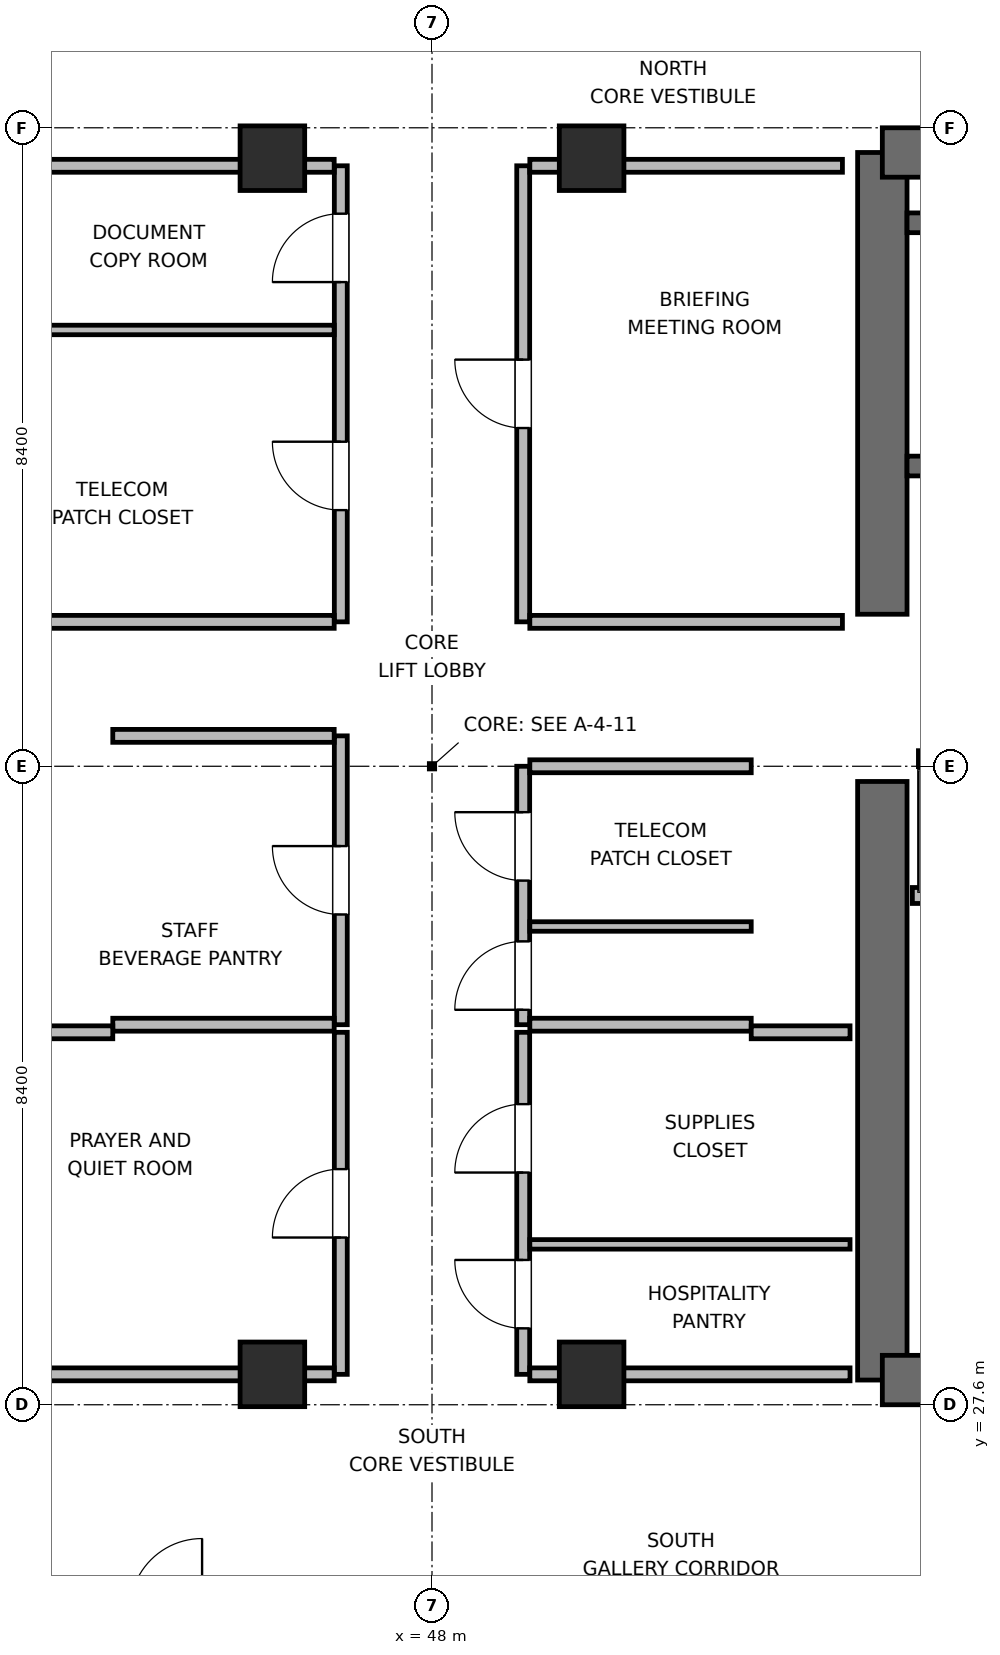
"""IFC4 building model, lengths in metres.
Left out: names, types, materials, properties, quantities, classifications, styles, units other than length and angle.
Written with IfcOpenShell. Run it as: python <this file> out.ifc"""

import sys

from ifc_helpers import new_model, si_unit, direction, frame, frame_2d, origin, origin_2d, place, context, subcontext, project, spatial, rectangle, extrude, element, fill, save


model = new_model("IFC4")
c1 = context("Model", 3, precision=1e-05, world=origin(), true_north=direction((0.0, 1.0)))
c2 = subcontext(c1, "Body", "Model", "MODEL_VIEW")
j1 = project(units=[si_unit("LENGTHUNIT", "METRE"), si_unit("PLANEANGLEUNIT", "RADIAN")], contexts=[c1])
p1 = place(None, origin())
s1 = spatial("IfcSite", under=j1, at=p1, CompositionType="ELEMENT")
p2 = place(p1, origin())
s2 = spatial("IfcBuilding", under=s1, at=p2, CompositionType="ELEMENT")
p3 = place(p2, frame((0.0, 0.0, 258.9)))
s3 = spatial("IfcBuildingStorey", under=s2, at=p3, CompositionType="ELEMENT", Elevation=258.9)
p4 = place(p3, frame((53.925, 27.925, 0.0), z_axis=(0.0, 0.0, 1.0), x_axis=(0.0, 1.0, 0.0)))
e1 = element("IfcWall", 1, at=p4, inside=s3, PredefinedType="SHEAR", context=c2, shape_type="SweptSolid", body=[
    extrude(rectangle(XDim=7.875, YDim=0.65, at=frame_2d((3.938, 0.0))), origin(), (0.0, 0.0, 1.0), 3.9),
])
p5 = place(p3, frame((53.925, 38.0, 0.0), z_axis=(0.0, 0.0, 1.0), x_axis=(0.0, 1.0, 0.0)))
e2 = element("IfcWall", 2, at=p5, inside=s3, PredefinedType="SHEAR", context=c2, shape_type="SweptSolid", body=[
    extrude(rectangle(XDim=6.075, YDim=0.65, at=frame_2d((3.038, 0.0))), origin(), (0.0, 0.0, 1.0), 3.9),
])
p6 = place(p3, frame((53.925, 27.925, 0.0), z_axis=(0.0, 0.0, 1.0), x_axis=(1.0, 0.0, 0.0)))
e3 = element("IfcWall", 3, at=p6, inside=s3, PredefinedType="SHEAR", context=c2, shape_type="SweptSolid", body=[
    extrude(rectangle(XDim=9.35, YDim=0.65, at=frame_2d((4.675, 0.0))), origin(), (0.0, 0.0, 1.0), 3.9),
])
p7 = place(p6, frame((4.025, 0.0, 0.0)))
e4 = element("IfcOpeningElement", 4, at=p7, cuts=e3, PredefinedType="OPENING", context=c2, shape_type="SweptSolid", body=[
    extrude(rectangle(XDim=1.05, YDim=2.04, at=frame_2d((0.525, 1.02))), frame((0.0, 0.335, 0.0), z_axis=(0.0, -1.0, 0.0), x_axis=(1.0, 0.0, 0.0)), (0.0, 0.0, 1.0), 0.67),
])
p8 = place(p3, frame((53.925, 44.075, 0.0), z_axis=(0.0, 0.0, 1.0), x_axis=(1.0, 0.0, 0.0)))
e5 = element("IfcWall", 5, at=p8, inside=s3, PredefinedType="SHEAR", context=c2, shape_type="SweptSolid", body=[
    extrude(rectangle(XDim=9.35, YDim=0.65, at=frame_2d((4.675, 0.0))), origin(), (0.0, 0.0, 1.0), 3.9),
])
p9 = place(p3, frame((54.25, 39.95, 0.0), z_axis=(0.0, 0.0, 1.0), x_axis=(1.0, 0.0, 0.0)))
e6 = element("IfcWall", 6, at=p9, inside=s3, PredefinedType="SHEAR", context=c2, shape_type="SweptSolid", body=[
    extrude(rectangle(XDim=8.7, YDim=0.26, at=frame_2d((4.35, 0.0))), origin(), (0.0, 0.0, 1.0), 3.9),
])
p10 = place(p9, frame((0.95, 0.0, 0.0)))
e7 = element("IfcOpeningElement", 7, at=p10, cuts=e6, PredefinedType="OPENING", context=c2, shape_type="SweptSolid", body=[
    extrude(rectangle(XDim=1.0, YDim=2.04, at=frame_2d((0.5, 1.02))), frame((0.0, 0.14, 0.0), z_axis=(0.0, -1.0, 0.0), x_axis=(1.0, 0.0, 0.0)), (0.0, 0.0, 1.0), 0.28),
])
p11 = place(p3, frame((54.25, 43.15, 0.0), z_axis=(0.0, 0.0, 1.0), x_axis=(1.0, 0.0, 0.0)))
e8 = element("IfcWall", 8, at=p11, inside=s3, PredefinedType="SHEAR", context=c2, shape_type="SweptSolid", body=[
    extrude(rectangle(XDim=8.7, YDim=0.26, at=frame_2d((4.35, 0.0))), origin(), (0.0, 0.0, 1.0), 3.9),
])
for number, where, z_axis, x_axis in (
    (9, (45.9, 28.0, 0.0), (0.0, 0.0, 1.0), (1.0, 0.0, 0.0)),
    (10, (50.1, 28.0, 0.0), (0.0, 0.0, 1.0), (1.0, 0.0, 0.0)),
    (11, (45.9, 44.0, 0.0), (0.0, 0.0, 1.0), (1.0, 0.0, 0.0)),
    (12, (50.1, 44.0, 0.0), (0.0, 0.0, 1.0), (1.0, 0.0, 0.0)),
):
    element("IfcColumn", number, at=place(p3, frame(where, z_axis=z_axis, x_axis=x_axis)), inside=s3, PredefinedType="COLUMN", context=c2, shape_type="SweptSolid", body=[
        extrude(rectangle(XDim=0.85, YDim=0.85, at=origin_2d()), origin(), (0.0, 0.0, 1.0), 3.9),
    ])
p12 = place(p3, frame((54.32, 34.3, 0.0), z_axis=(0.0, 0.0, 1.0), x_axis=(1.0, 0.0, 0.0)))
e13 = element("IfcWall", 13, at=p12, inside=s3, PredefinedType="PARTITIONING", context=c2, shape_type="SweptSolid", body=[
    extrude(rectangle(XDim=3.48, YDim=0.21, at=frame_2d((1.74, 0.0))), origin(), (0.0, 0.0, 1.0), 3.68),
])
p13 = place(p3, frame((54.4, 36.1, 0.0), z_axis=(0.0, 0.0, 1.0), x_axis=(1.0, 0.0, 0.0)))
e14 = element("IfcWall", 14, at=p13, inside=s3, PredefinedType="PARTITIONING", context=c2, shape_type="SweptSolid", body=[
    extrude(rectangle(XDim=2.1, YDim=0.21, at=frame_2d((1.05, 0.0))), origin(), (0.0, 0.0, 1.0), 3.68),
])
p14 = place(p13, frame((0.5, 0.0, 0.0)))
e15 = element("IfcOpeningElement", 15, at=p14, cuts=e14, PredefinedType="OPENING", context=c2, shape_type="SweptSolid", body=[
    extrude(rectangle(XDim=1.1, YDim=2.04, at=frame_2d((0.55, 1.02))), frame((0.0, 0.115, 0.0), z_axis=(0.0, -1.0, 0.0), x_axis=(1.0, 0.0, 0.0)), (0.0, 0.0, 1.0), 0.23),
])
p15 = place(p3, frame((46.8, 32.6, 0.0), z_axis=(0.0, 0.0, 1.0), x_axis=(0.0, 1.0, 0.0)))
e16 = element("IfcWall", 16, at=p15, inside=s3, PredefinedType="PARTITIONING", context=c2, shape_type="SweptSolid", body=[
    extrude(rectangle(XDim=3.8, YDim=0.17, at=frame_2d((1.9, 0.0))), origin(), (0.0, 0.0, 1.0), 3.68),
])
p16 = place(p15, frame((1.45, 0.0, 0.0)))
e17 = element("IfcOpeningElement", 17, at=p16, cuts=e16, PredefinedType="OPENING", context=c2, shape_type="SweptSolid", body=[
    extrude(rectangle(XDim=0.9, YDim=2.02, at=frame_2d((0.45, 1.01))), frame((0.0, 0.095, 0.0), z_axis=(0.0, -1.0, 0.0), x_axis=(1.0, 0.0, 0.0)), (0.0, 0.0, 1.0), 0.19),
])
for number, where, z_axis, x_axis in (
    (18, (43.8, 32.6, 0.0), (0.0, 0.0, 1.0), (1.0, 0.0, 0.0)),
    (19, (43.8, 36.4, 0.0), (0.0, 0.0, 1.0), (1.0, 0.0, 0.0)),
):
    element("IfcWall", number, at=place(p3, frame(where, z_axis=z_axis, x_axis=x_axis)), inside=s3, PredefinedType="PARTITIONING", context=c2, shape_type="SweptSolid", body=[
        extrude(rectangle(XDim=2.913, YDim=0.17, at=frame_2d((1.457, 0.0))), origin(), (0.0, 0.0, 1.0), 3.68),
    ])
p17 = place(p3, frame((49.2, 32.6, 0.0), z_axis=(0.0, 0.0, 1.0), x_axis=(0.0, 1.0, 0.0)))
e20 = element("IfcWall", 20, at=p17, inside=s3, PredefinedType="PARTITIONING", context=c2, shape_type="SweptSolid", body=[
    extrude(rectangle(XDim=3.4, YDim=0.17, at=frame_2d((1.7, 0.0))), origin(), (0.0, 0.0, 1.0), 3.68),
])
p18 = place(p17, frame((0.196, 0.0, 0.0)))
e21 = element("IfcOpeningElement", 21, at=p18, cuts=e20, PredefinedType="OPENING", context=c2, shape_type="SweptSolid", body=[
    extrude(rectangle(XDim=0.9, YDim=2.02, at=frame_2d((0.45, 1.01))), frame((0.0, 0.095, 0.0), z_axis=(0.0, -1.0, 0.0), x_axis=(1.0, 0.0, 0.0)), (0.0, 0.0, 1.0), 0.19),
])
p19 = place(p17, frame((1.896, 0.0, 0.0)))
e22 = element("IfcOpeningElement", 22, at=p19, cuts=e20, PredefinedType="OPENING", context=c2, shape_type="SweptSolid", body=[
    extrude(rectangle(XDim=0.9, YDim=2.02, at=frame_2d((0.45, 1.01))), frame((0.0, 0.095, 0.0), z_axis=(0.0, -1.0, 0.0), x_axis=(1.0, 0.0, 0.0)), (0.0, 0.0, 1.0), 0.19),
])
for number, where, z_axis, x_axis in (
    (23, (49.287, 32.6, 0.0), (0.0, 0.0, 1.0), (1.0, 0.0, 0.0)),
    (24, (49.287, 36.0, 0.0), (0.0, 0.0, 1.0), (1.0, 0.0, 0.0)),
):
    element("IfcWall", number, at=place(p3, frame(where, z_axis=z_axis, x_axis=x_axis)), inside=s3, PredefinedType="PARTITIONING", context=c2, shape_type="SweptSolid", body=[
        extrude(rectangle(XDim=2.913, YDim=0.17, at=frame_2d((1.457, 0.0))), origin(), (0.0, 0.0, 1.0), 3.68),
    ])
p20 = place(p3, frame((49.287, 33.892, 0.0), z_axis=(0.0, 0.0, 1.0), x_axis=(1.0, 0.0, 0.0)))
e25 = element("IfcWall", 25, at=p20, inside=s3, PredefinedType="PARTITIONING", context=c2, shape_type="SweptSolid", body=[
    extrude(rectangle(XDim=2.913, YDim=0.125, at=frame_2d((1.457, 0.0))), origin(), (0.0, 0.0, 1.0), 3.68),
])
p21 = place(p3, frame((46.8, 28.0, 0.0), z_axis=(0.0, 0.0, 1.0), x_axis=(0.0, 1.0, 0.0)))
e26 = element("IfcWall", 26, at=p21, inside=s3, PredefinedType="PARTITIONING", context=c2, shape_type="SweptSolid", body=[
    extrude(rectangle(XDim=4.5, YDim=0.17, at=frame_2d((2.25, 0.0))), origin(), (0.0, 0.0, 1.0), 3.68),
])
p22 = place(p21, frame((1.8, 0.0, 0.0)))
e27 = element("IfcOpeningElement", 27, at=p22, cuts=e26, PredefinedType="OPENING", context=c2, shape_type="SweptSolid", body=[
    extrude(rectangle(XDim=0.9, YDim=2.02, at=frame_2d((0.45, 1.01))), frame((0.0, 0.095, 0.0), z_axis=(0.0, -1.0, 0.0), x_axis=(1.0, 0.0, 0.0)), (0.0, 0.0, 1.0), 0.19),
])
p23 = place(p3, frame((42.5, 28.0, 0.0), z_axis=(0.0, 0.0, 1.0), x_axis=(1.0, 0.0, 0.0)))
e28 = element("IfcWall", 28, at=p23, inside=s3, PredefinedType="PARTITIONING", context=c2, shape_type="SweptSolid", body=[
    extrude(rectangle(XDim=4.213, YDim=0.17, at=frame_2d((2.106, 0.0))), origin(), (0.0, 0.0, 1.0), 2.765),
])
p24 = place(p3, frame((42.5, 32.5, 0.0), z_axis=(0.0, 0.0, 1.0), x_axis=(1.0, 0.0, 0.0)))
e29 = element("IfcWall", 29, at=p24, inside=s3, PredefinedType="PARTITIONING", context=c2, shape_type="SweptSolid", body=[
    extrude(rectangle(XDim=1.3, YDim=0.17, at=frame_2d((0.65, 0.0))), origin(), (0.0, 0.0, 1.0), 3.68),
])
p25 = place(p3, frame((49.2, 28.0, 0.0), z_axis=(0.0, 0.0, 1.0), x_axis=(0.0, 1.0, 0.0)))
e30 = element("IfcWall", 30, at=p25, inside=s3, PredefinedType="PARTITIONING", context=c2, shape_type="SweptSolid", body=[
    extrude(rectangle(XDim=4.5, YDim=0.17, at=frame_2d((2.25, 0.0))), origin(), (0.0, 0.0, 1.0), 3.68),
])
p26 = place(p25, frame((0.605, 0.0, 0.0)))
e31 = element("IfcOpeningElement", 31, at=p26, cuts=e30, PredefinedType="OPENING", context=c2, shape_type="SweptSolid", body=[
    extrude(rectangle(XDim=0.9, YDim=2.02, at=frame_2d((0.45, 1.01))), frame((0.0, 0.095, 0.0), z_axis=(0.0, -1.0, 0.0), x_axis=(1.0, 0.0, 0.0)), (0.0, 0.0, 1.0), 0.19),
])
p27 = place(p25, frame((2.655, 0.0, 0.0)))
e32 = element("IfcOpeningElement", 32, at=p27, cuts=e30, PredefinedType="OPENING", context=c2, shape_type="SweptSolid", body=[
    extrude(rectangle(XDim=0.9, YDim=2.02, at=frame_2d((0.45, 1.01))), frame((0.0, 0.095, 0.0), z_axis=(0.0, -1.0, 0.0), x_axis=(1.0, 0.0, 0.0)), (0.0, 0.0, 1.0), 0.19),
])
p28 = place(p3, frame((49.287, 28.0, 0.0), z_axis=(0.0, 0.0, 1.0), x_axis=(1.0, 0.0, 0.0)))
e33 = element("IfcWall", 33, at=p28, inside=s3, PredefinedType="PARTITIONING", context=c2, shape_type="SweptSolid", body=[
    extrude(rectangle(XDim=4.213, YDim=0.17, at=frame_2d((2.106, 0.0))), origin(), (0.0, 0.0, 1.0), 2.765),
])
p29 = place(p3, frame((52.2, 32.5, 0.0), z_axis=(0.0, 0.0, 1.0), x_axis=(1.0, 0.0, 0.0)))
e34 = element("IfcWall", 34, at=p29, inside=s3, PredefinedType="PARTITIONING", context=c2, shape_type="SweptSolid", body=[
    extrude(rectangle(XDim=1.3, YDim=0.17, at=frame_2d((0.65, 0.0))), origin(), (0.0, 0.0, 1.0), 3.68),
])
p30 = place(p3, frame((49.287, 29.71, 0.0), z_axis=(0.0, 0.0, 1.0), x_axis=(1.0, 0.0, 0.0)))
e35 = element("IfcWall", 35, at=p30, inside=s3, PredefinedType="PARTITIONING", context=c2, shape_type="SweptSolid", body=[
    extrude(rectangle(XDim=4.213, YDim=0.125, at=frame_2d((2.106, 0.0))), origin(), (0.0, 0.0, 1.0), 3.68),
])
p31 = place(p3, frame((46.8, 37.9, 0.0), z_axis=(0.0, 0.0, 1.0), x_axis=(0.0, 1.0, 0.0)))
e36 = element("IfcWall", 36, at=p31, inside=s3, PredefinedType="PARTITIONING", context=c2, shape_type="SweptSolid", body=[
    extrude(rectangle(XDim=6.0, YDim=0.17, at=frame_2d((3.0, 0.0))), origin(), (0.0, 0.0, 1.0), 3.68),
])
p32 = place(p31, frame((1.47, 0.0, 0.0)))
e37 = element("IfcOpeningElement", 37, at=p32, cuts=e36, PredefinedType="OPENING", context=c2, shape_type="SweptSolid", body=[
    extrude(rectangle(XDim=0.9, YDim=2.02, at=frame_2d((0.45, 1.01))), frame((0.0, 0.095, 0.0), z_axis=(0.0, -1.0, 0.0), x_axis=(1.0, 0.0, 0.0)), (0.0, 0.0, 1.0), 0.19),
])
p33 = place(p31, frame((4.47, 0.0, 0.0)))
e38 = element("IfcOpeningElement", 38, at=p33, cuts=e36, PredefinedType="OPENING", context=c2, shape_type="SweptSolid", body=[
    extrude(rectangle(XDim=0.9, YDim=2.02, at=frame_2d((0.45, 1.01))), frame((0.0, 0.095, 0.0), z_axis=(0.0, -1.0, 0.0), x_axis=(1.0, 0.0, 0.0)), (0.0, 0.0, 1.0), 0.19),
])
p34 = place(p3, frame((42.5, 37.9, 0.0), z_axis=(0.0, 0.0, 1.0), x_axis=(1.0, 0.0, 0.0)))
e39 = element("IfcWall", 39, at=p34, inside=s3, PredefinedType="PARTITIONING", context=c2, shape_type="SweptSolid", body=[
    extrude(rectangle(XDim=4.213, YDim=0.17, at=frame_2d((2.106, 0.0))), origin(), (0.0, 0.0, 1.0), 3.68),
])
p35 = place(p3, frame((42.5, 43.9, 0.0), z_axis=(0.0, 0.0, 1.0), x_axis=(1.0, 0.0, 0.0)))
e40 = element("IfcWall", 40, at=p35, inside=s3, PredefinedType="PARTITIONING", context=c2, shape_type="SweptSolid", body=[
    extrude(rectangle(XDim=4.213, YDim=0.17, at=frame_2d((2.106, 0.0))), origin(), (0.0, 0.0, 1.0), 2.765),
])
p36 = place(p3, frame((42.5, 41.74, 0.0), z_axis=(0.0, 0.0, 1.0), x_axis=(1.0, 0.0, 0.0)))
e41 = element("IfcWall", 41, at=p36, inside=s3, PredefinedType="PARTITIONING", context=c2, shape_type="SweptSolid", body=[
    extrude(rectangle(XDim=4.213, YDim=0.125, at=frame_2d((2.106, 0.0))), origin(), (0.0, 0.0, 1.0), 3.68),
])
p37 = place(p3, frame((49.2, 37.9, 0.0), z_axis=(0.0, 0.0, 1.0), x_axis=(0.0, 1.0, 0.0)))
e42 = element("IfcWall", 42, at=p37, inside=s3, PredefinedType="PARTITIONING", context=c2, shape_type="SweptSolid", body=[
    extrude(rectangle(XDim=6.0, YDim=0.17, at=frame_2d((3.0, 0.0))), origin(), (0.0, 0.0, 1.0), 3.68),
])
p38 = place(p37, frame((2.55, 0.0, 0.0)))
e43 = element("IfcOpeningElement", 43, at=p38, cuts=e42, PredefinedType="OPENING", context=c2, shape_type="SweptSolid", body=[
    extrude(rectangle(XDim=0.9, YDim=2.02, at=frame_2d((0.45, 1.01))), frame((0.0, 0.095, 0.0), z_axis=(0.0, -1.0, 0.0), x_axis=(1.0, 0.0, 0.0)), (0.0, 0.0, 1.0), 0.19),
])
p39 = place(p3, frame((49.287, 37.9, 0.0), z_axis=(0.0, 0.0, 1.0), x_axis=(1.0, 0.0, 0.0)))
e44 = element("IfcWall", 44, at=p39, inside=s3, PredefinedType="PARTITIONING", context=c2, shape_type="SweptSolid", body=[
    extrude(rectangle(XDim=4.113, YDim=0.17, at=frame_2d((2.056, 0.0))), origin(), (0.0, 0.0, 1.0), 3.68),
])
p40 = place(p3, frame((49.287, 43.9, 0.0), z_axis=(0.0, 0.0, 1.0), x_axis=(1.0, 0.0, 0.0)))
e45 = element("IfcWall", 45, at=p40, inside=s3, PredefinedType="PARTITIONING", context=c2, shape_type="SweptSolid", body=[
    extrude(rectangle(XDim=4.113, YDim=0.17, at=frame_2d((2.056, 0.0))), origin(), (0.0, 0.0, 1.0), 2.765),
])
p41 = place(p16, origin())
e46 = element("IfcDoor", 46, at=p41, inside=s3, OperationType="SINGLE_SWING_RIGHT", PredefinedType="DOOR", context=c2, shape_type="SweptSolid", body=[
    extrude(rectangle(XDim=0.9, YDim=2.02, at=frame_2d((0.45, 1.01))), frame((0.0, 0.025, 0.0), z_axis=(0.0, -1.0, 0.0), x_axis=(1.0, 0.0, 0.0)), (0.0, 0.0, 1.0), 0.05),
])
fill(e17, e46)
p42 = place(p18, origin())
e47 = element("IfcDoor", 47, at=p42, inside=s3, OperationType="SINGLE_SWING_LEFT", PredefinedType="DOOR", context=c2, shape_type="SweptSolid", body=[
    extrude(rectangle(XDim=0.9, YDim=2.02, at=frame_2d((0.45, 1.01))), frame((0.0, 0.025, 0.0), z_axis=(0.0, -1.0, 0.0), x_axis=(1.0, 0.0, 0.0)), (0.0, 0.0, 1.0), 0.05),
])
fill(e21, e47)
p43 = place(p19, origin())
e48 = element("IfcDoor", 48, at=p43, inside=s3, OperationType="SINGLE_SWING_RIGHT", PredefinedType="DOOR", context=c2, shape_type="SweptSolid", body=[
    extrude(rectangle(XDim=0.9, YDim=2.02, at=frame_2d((0.45, 1.01))), frame((0.0, 0.025, 0.0), z_axis=(0.0, -1.0, 0.0), x_axis=(1.0, 0.0, 0.0)), (0.0, 0.0, 1.0), 0.05),
])
fill(e22, e48)
p44 = place(p22, origin())
e49 = element("IfcDoor", 49, at=p44, inside=s3, OperationType="SINGLE_SWING_LEFT", PredefinedType="DOOR", context=c2, shape_type="SweptSolid", body=[
    extrude(rectangle(XDim=0.9, YDim=2.02, at=frame_2d((0.45, 1.01))), frame((0.0, 0.025, 0.0), z_axis=(0.0, -1.0, 0.0), x_axis=(1.0, 0.0, 0.0)), (0.0, 0.0, 1.0), 0.05),
])
fill(e27, e49)
p45 = place(p26, origin())
e50 = element("IfcDoor", 50, at=p45, inside=s3, OperationType="SINGLE_SWING_RIGHT", PredefinedType="DOOR", context=c2, shape_type="SweptSolid", body=[
    extrude(rectangle(XDim=0.9, YDim=2.02, at=frame_2d((0.45, 1.01))), frame((0.0, 0.025, 0.0), z_axis=(0.0, -1.0, 0.0), x_axis=(1.0, 0.0, 0.0)), (0.0, 0.0, 1.0), 0.05),
])
fill(e31, e50)
p46 = place(p27, origin())
e51 = element("IfcDoor", 51, at=p46, inside=s3, OperationType="SINGLE_SWING_LEFT", PredefinedType="DOOR", context=c2, shape_type="SweptSolid", body=[
    extrude(rectangle(XDim=0.9, YDim=2.02, at=frame_2d((0.45, 1.01))), frame((0.0, 0.025, 0.0), z_axis=(0.0, -1.0, 0.0), x_axis=(1.0, 0.0, 0.0)), (0.0, 0.0, 1.0), 0.05),
])
fill(e32, e51)
p47 = place(p32, origin())
e52 = element("IfcDoor", 52, at=p47, inside=s3, OperationType="SINGLE_SWING_RIGHT", PredefinedType="DOOR", context=c2, shape_type="SweptSolid", body=[
    extrude(rectangle(XDim=0.9, YDim=2.02, at=frame_2d((0.45, 1.01))), frame((0.0, 0.025, 0.0), z_axis=(0.0, -1.0, 0.0), x_axis=(1.0, 0.0, 0.0)), (0.0, 0.0, 1.0), 0.05),
])
fill(e37, e52)
p48 = place(p33, origin())
e53 = element("IfcDoor", 53, at=p48, inside=s3, OperationType="SINGLE_SWING_LEFT", PredefinedType="DOOR", context=c2, shape_type="SweptSolid", body=[
    extrude(rectangle(XDim=0.9, YDim=2.02, at=frame_2d((0.45, 1.01))), frame((0.0, 0.025, 0.0), z_axis=(0.0, -1.0, 0.0), x_axis=(1.0, 0.0, 0.0)), (0.0, 0.0, 1.0), 0.05),
])
fill(e38, e53)
p49 = place(p38, origin())
e54 = element("IfcDoor", 54, at=p49, inside=s3, OperationType="SINGLE_SWING_RIGHT", PredefinedType="DOOR", context=c2, shape_type="SweptSolid", body=[
    extrude(rectangle(XDim=0.9, YDim=2.02, at=frame_2d((0.45, 1.01))), frame((0.0, 0.025, 0.0), z_axis=(0.0, -1.0, 0.0), x_axis=(1.0, 0.0, 0.0)), (0.0, 0.0, 1.0), 0.05),
])
fill(e43, e54)
save(model, sys.argv[1])
